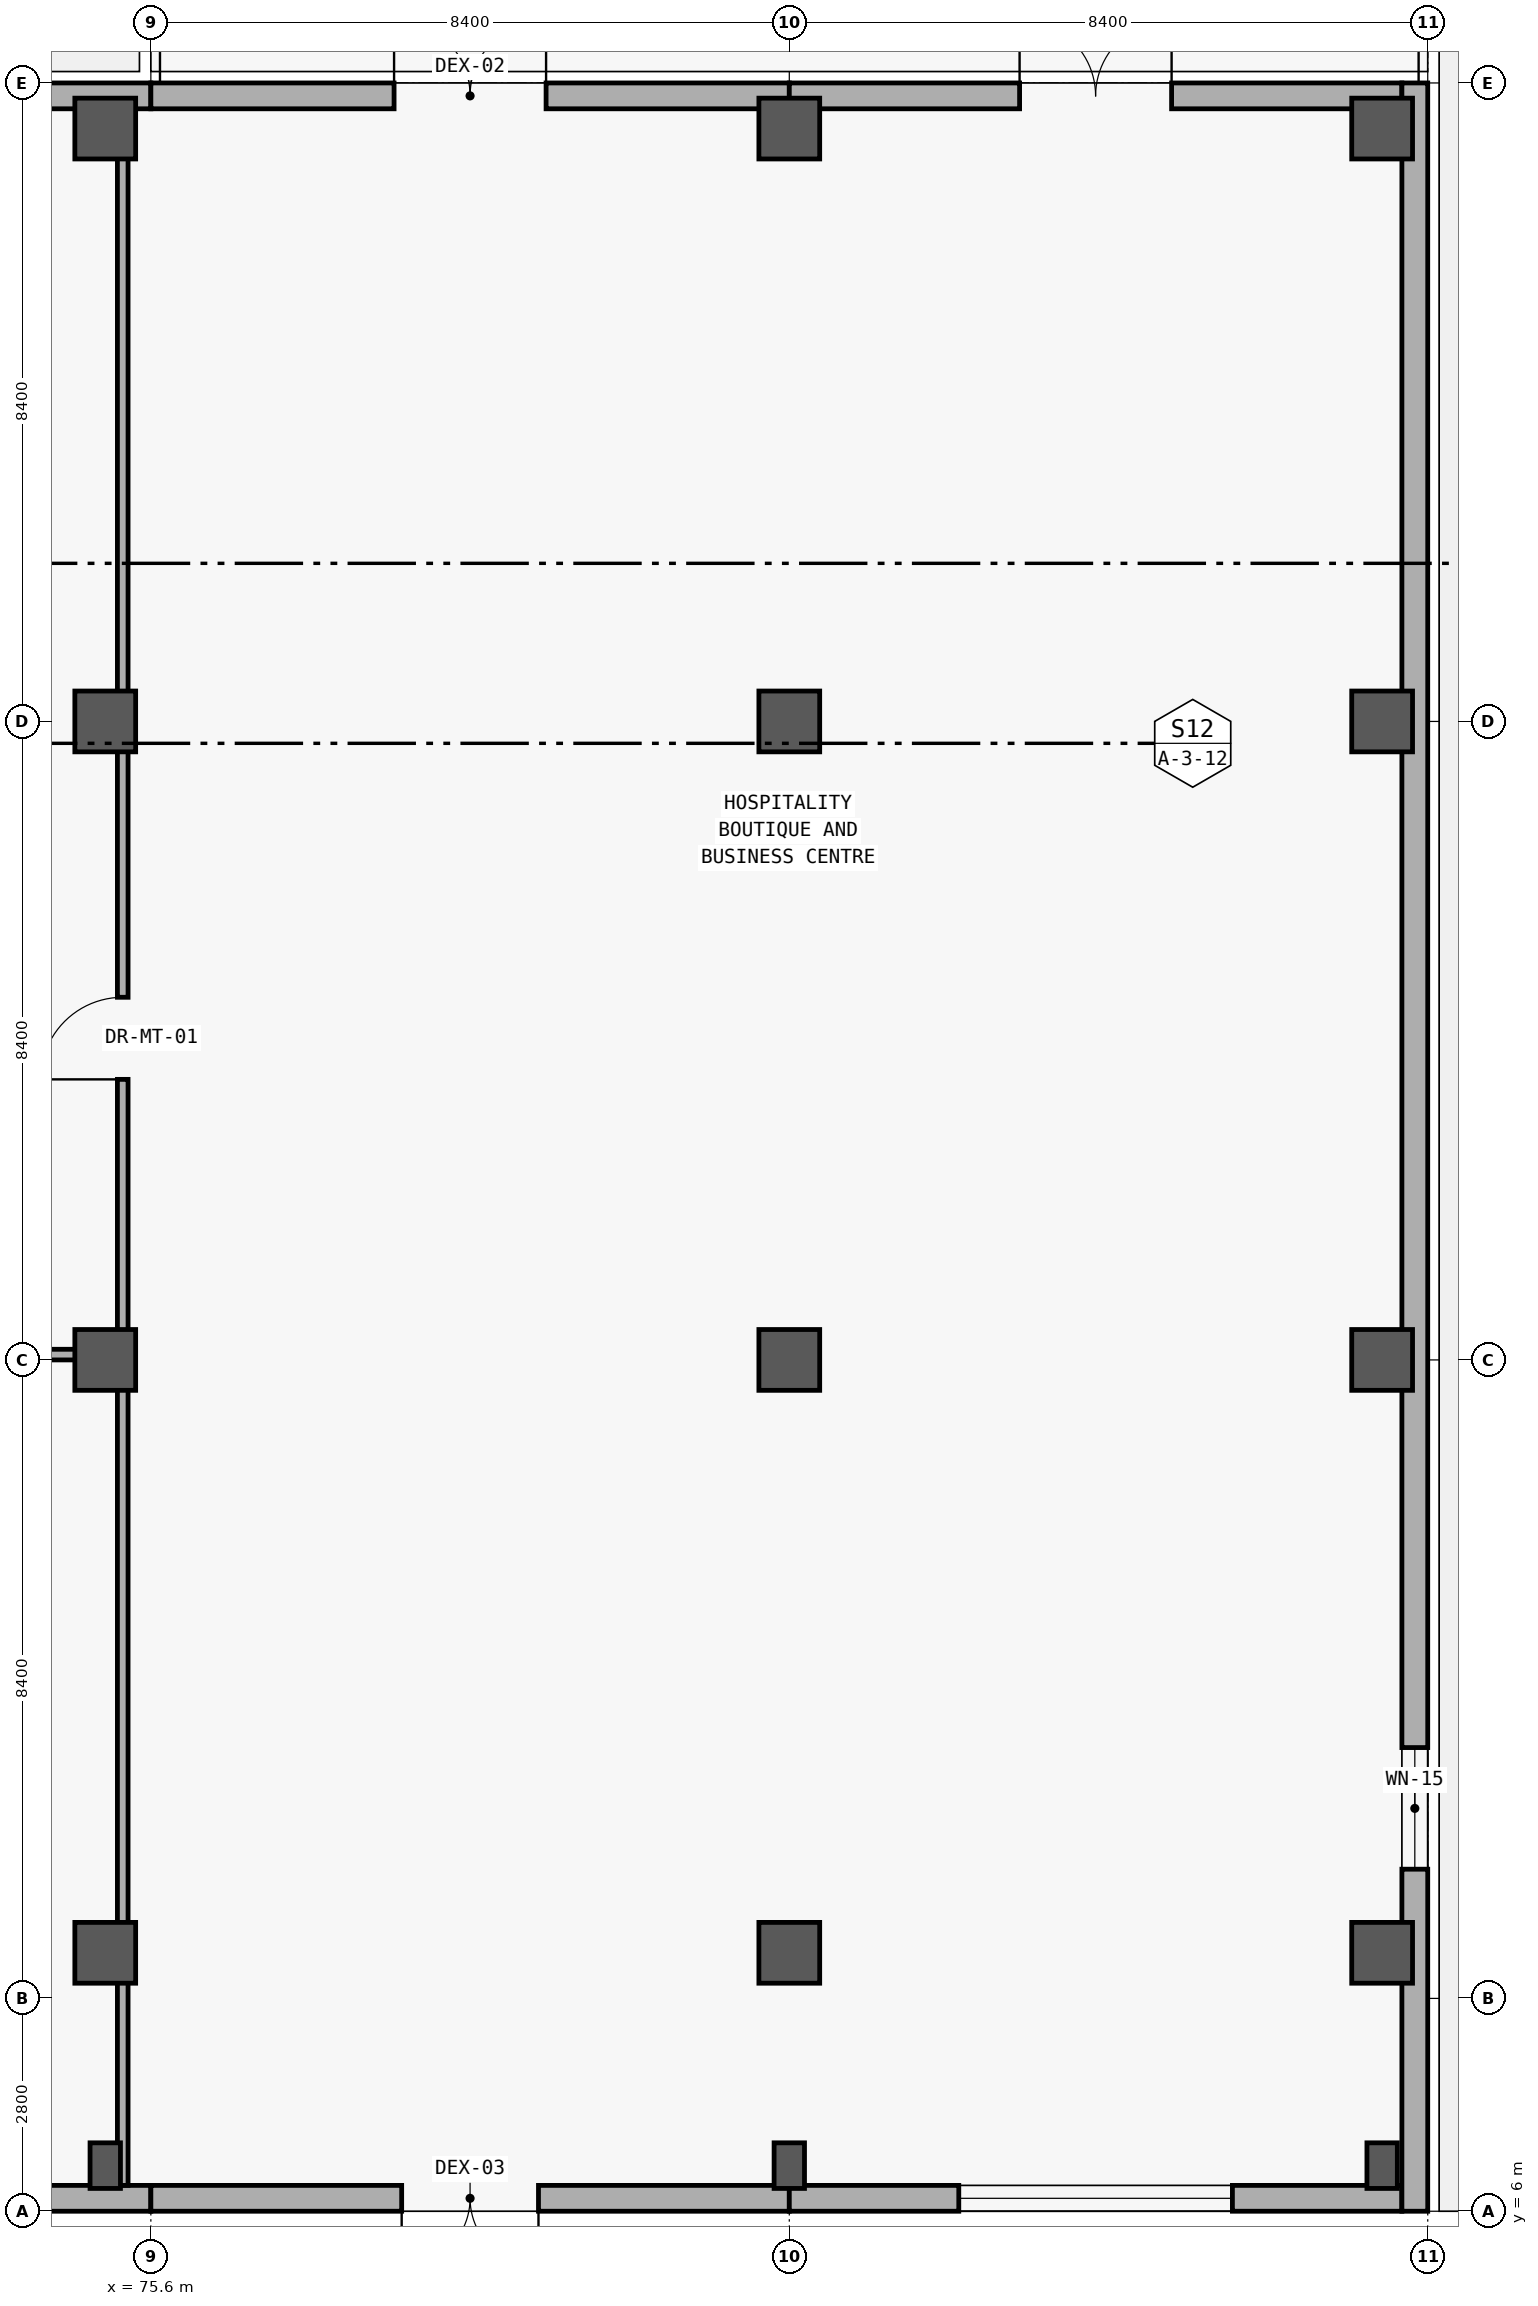
"""IFC4 building model, lengths in metres.
Left out: names, types, materials, properties, quantities, classifications, styles, units other than length and angle.
Written with IfcOpenShell. Run it as: python <this file> out.ifc"""

import sys

from ifc_helpers import new_model, si_unit, direction, frame, frame_2d, origin, origin_2d, place, context, subcontext, project, spatial, rectangle, extrude, element, fill, save


model = new_model("IFC4")
c1 = context("Model", 3, precision=1e-05, world=origin(), true_north=direction((0.0, 1.0)))
c2 = subcontext(c1, "Body", "Model", "MODEL_VIEW")
j1 = project(units=[si_unit("LENGTHUNIT", "METRE"), si_unit("PLANEANGLEUNIT", "RADIAN")], contexts=[c1])
p1 = place(None, origin())
s1 = spatial("IfcSite", under=j1, at=p1, CompositionType="ELEMENT")
p2 = place(p1, origin())
s2 = spatial("IfcBuilding", under=s1, at=p2, CompositionType="ELEMENT")
p3 = place(p2, origin())
s3 = spatial("IfcBuildingStorey", under=s2, at=p3, CompositionType="ELEMENT", Elevation=0.0)
p4 = place(p3, frame((75.0, 6.6, 0.0), z_axis=(0.0, 0.0, 1.0), x_axis=(1.0, 0.0, 0.0)))
e1 = element("IfcColumn", 1, at=p4, inside=s3, PredefinedType="PILASTER", context=c2, shape_type="SweptSolid", body=[
    extrude(rectangle(XDim=0.4, YDim=0.6, at=origin_2d()), origin(), (0.0, 0.0, 1.0), 5.4),
])
for number, where, z_axis, x_axis in (
    (2, (75.0, 9.4, 0.0), (0.0, 0.0, 1.0), (1.0, 0.0, 0.0)),
    (3, (75.0, 17.2, 0.0), (0.0, 0.0, 1.0), (1.0, 0.0, 0.0)),
    (4, (75.0, 25.6, 0.0), (0.0, 0.0, 1.0), (1.0, 0.0, 0.0)),
    (5, (75.0, 33.4, 0.0), (0.0, 0.0, 1.0), (1.0, 0.0, 0.0)),
):
    element("IfcColumn", number, at=place(p3, frame(where, z_axis=z_axis, x_axis=x_axis)), inside=s3, PredefinedType="COLUMN", context=c2, shape_type="SweptSolid", body=[
        extrude(rectangle(XDim=0.8, YDim=0.8, at=origin_2d()), origin(), (0.0, 0.0, 1.0), 5.4),
    ])
p5 = place(p3, frame((84.0, 6.6, 0.0), z_axis=(0.0, 0.0, 1.0), x_axis=(1.0, 0.0, 0.0)))
e6 = element("IfcColumn", 6, at=p5, inside=s3, PredefinedType="PILASTER", context=c2, shape_type="SweptSolid", body=[
    extrude(rectangle(XDim=0.4, YDim=0.6, at=origin_2d()), origin(), (0.0, 0.0, 1.0), 5.4),
])
for number, where, z_axis, x_axis in (
    (7, (84.0, 9.4, 0.0), (0.0, 0.0, 1.0), (1.0, 0.0, 0.0)),
    (8, (84.0, 17.2, 0.0), (0.0, 0.0, 1.0), (1.0, 0.0, 0.0)),
    (9, (84.0, 25.6, 0.0), (0.0, 0.0, 1.0), (1.0, 0.0, 0.0)),
    (10, (84.0, 33.4, 0.0), (0.0, 0.0, 1.0), (1.0, 0.0, 0.0)),
):
    element("IfcColumn", number, at=place(p3, frame(where, z_axis=z_axis, x_axis=x_axis)), inside=s3, PredefinedType="COLUMN", context=c2, shape_type="SweptSolid", body=[
        extrude(rectangle(XDim=0.8, YDim=0.8, at=origin_2d()), origin(), (0.0, 0.0, 1.0), 5.4),
    ])
p6 = place(p3, frame((91.8, 6.6, 0.0), z_axis=(0.0, 0.0, 1.0), x_axis=(1.0, 0.0, 0.0)))
e11 = element("IfcColumn", 11, at=p6, inside=s3, PredefinedType="PILASTER", context=c2, shape_type="SweptSolid", body=[
    extrude(rectangle(XDim=0.4, YDim=0.6, at=origin_2d()), origin(), (0.0, 0.0, 1.0), 5.4),
])
for number, where, z_axis, x_axis in (
    (12, (91.8, 9.4, 0.0), (0.0, 0.0, 1.0), (1.0, 0.0, 0.0)),
    (13, (91.8, 17.2, 0.0), (0.0, 0.0, 1.0), (1.0, 0.0, 0.0)),
    (14, (91.8, 25.6, 0.0), (0.0, 0.0, 1.0), (1.0, 0.0, 0.0)),
    (15, (91.8, 33.4, 0.0), (0.0, 0.0, 1.0), (1.0, 0.0, 0.0)),
):
    element("IfcColumn", number, at=place(p3, frame(where, z_axis=z_axis, x_axis=x_axis)), inside=s3, PredefinedType="COLUMN", context=c2, shape_type="SweptSolid", body=[
        extrude(rectangle(XDim=0.8, YDim=0.8, at=origin_2d()), origin(), (0.0, 0.0, 1.0), 5.4),
    ])
p7 = place(p3, frame((75.6, 6.17, 0.0), z_axis=(0.0, 0.0, 1.0), x_axis=(-1.0, 0.0, 0.0)))
e16 = element("IfcWall", 16, at=p7, inside=s3, PredefinedType="SOLIDWALL", context=c2, shape_type="SweptSolid", body=[
    extrude(rectangle(XDim=8.4, YDim=0.34, at=frame_2d((4.2, 0.0))), origin(), (0.0, 0.0, 1.0), 5.1),
])
p8 = place(p7, frame((2.4, 0.0, 0.9)))
e17 = element("IfcOpeningElement", 17, at=p8, cuts=e16, PredefinedType="OPENING", context=c2, shape_type="SweptSolid", body=[
    extrude(rectangle(XDim=3.6, YDim=2.3, at=frame_2d((1.8, 1.15))), frame((0.0, 0.18, 0.0), z_axis=(0.0, -1.0, 0.0), x_axis=(1.0, 0.0, 0.0)), (0.0, 0.0, 1.0), 0.36),
])
p9 = place(p3, frame((67.2, 33.83, 0.0), z_axis=(0.0, 0.0, 1.0), x_axis=(1.0, 0.0, 0.0)))
e18 = element("IfcWall", 18, at=p9, inside=s3, PredefinedType="SOLIDWALL", context=c2, shape_type="SweptSolid", body=[
    extrude(rectangle(XDim=8.4, YDim=0.34, at=frame_2d((4.2, 0.0))), origin(), (0.0, 0.0, 1.0), 5.1),
])
p10 = place(p9, frame((2.65, 0.0, 0.9)))
e19 = element("IfcOpeningElement", 19, at=p10, cuts=e18, PredefinedType="OPENING", context=c2, shape_type="SweptSolid", body=[
    extrude(rectangle(XDim=3.1, YDim=2.2, at=frame_2d((1.55, 1.1))), frame((0.0, 0.18, 0.0), z_axis=(0.0, -1.0, 0.0), x_axis=(1.0, 0.0, 0.0)), (0.0, 0.0, 1.0), 0.36),
])
p11 = place(p3, frame((84.0, 6.17, 0.0), z_axis=(0.0, 0.0, 1.0), x_axis=(-1.0, 0.0, 0.0)))
e20 = element("IfcWall", 20, at=p11, inside=s3, PredefinedType="SOLIDWALL", context=c2, shape_type="SweptSolid", body=[
    extrude(rectangle(XDim=8.4, YDim=0.34, at=frame_2d((4.2, 0.0))), origin(), (0.0, 0.0, 1.0), 5.1),
])
p12 = place(p11, frame((3.3, 0.0, 0.0)))
e21 = element("IfcOpeningElement", 21, at=p12, cuts=e20, PredefinedType="OPENING", context=c2, shape_type="SweptSolid", body=[
    extrude(rectangle(XDim=1.8, YDim=2.4, at=frame_2d((0.9, 1.2))), frame((0.0, 0.18, 0.0), z_axis=(0.0, -1.0, 0.0), x_axis=(1.0, 0.0, 0.0)), (0.0, 0.0, 1.0), 0.36),
])
p13 = place(p3, frame((75.6, 33.83, 0.0), z_axis=(0.0, 0.0, 1.0), x_axis=(1.0, 0.0, 0.0)))
e22 = element("IfcWall", 22, at=p13, inside=s3, PredefinedType="SOLIDWALL", context=c2, shape_type="SweptSolid", body=[
    extrude(rectangle(XDim=8.4, YDim=0.34, at=frame_2d((4.2, 0.0))), origin(), (0.0, 0.0, 1.0), 5.1),
])
p14 = place(p13, frame((3.2, 0.0, 0.0)))
e23 = element("IfcOpeningElement", 23, at=p14, cuts=e22, PredefinedType="OPENING", context=c2, shape_type="SweptSolid", body=[
    extrude(rectangle(XDim=2.0, YDim=2.6, at=frame_2d((1.0, 1.3))), frame((0.0, 0.18, 0.0), z_axis=(0.0, -1.0, 0.0), x_axis=(1.0, 0.0, 0.0)), (0.0, 0.0, 1.0), 0.36),
])
p15 = place(p3, frame((92.06, 6.17, 0.0), z_axis=(0.0, 0.0, 1.0), x_axis=(-1.0, 0.0, 0.0)))
e24 = element("IfcWall", 24, at=p15, inside=s3, PredefinedType="SOLIDWALL", context=c2, shape_type="SweptSolid", body=[
    extrude(rectangle(XDim=8.06, YDim=0.34, at=frame_2d((4.03, 0.0))), origin(), (0.0, 0.0, 1.0), 5.1),
])
p16 = place(p15, frame((2.23, 0.0, 0.9)))
e25 = element("IfcOpeningElement", 25, at=p16, cuts=e24, PredefinedType="OPENING", context=c2, shape_type="SweptSolid", body=[
    extrude(rectangle(XDim=3.6, YDim=2.3, at=frame_2d((1.8, 1.15))), frame((0.0, 0.18, 0.0), z_axis=(0.0, -1.0, 0.0), x_axis=(1.0, 0.0, 0.0)), (0.0, 0.0, 1.0), 0.36),
])
p17 = place(p3, frame((84.0, 33.83, 0.0), z_axis=(0.0, 0.0, 1.0), x_axis=(1.0, 0.0, 0.0)))
e26 = element("IfcWall", 26, at=p17, inside=s3, PredefinedType="SOLIDWALL", context=c2, shape_type="SweptSolid", body=[
    extrude(rectangle(XDim=8.06, YDim=0.34, at=frame_2d((4.03, 0.0))), origin(), (0.0, 0.0, 1.0), 5.1),
])
p18 = place(p17, frame((3.03, 0.0, 0.0)))
e27 = element("IfcOpeningElement", 27, at=p18, cuts=e26, PredefinedType="OPENING", context=c2, shape_type="SweptSolid", body=[
    extrude(rectangle(XDim=2.0, YDim=2.6, at=frame_2d((1.0, 1.3))), frame((0.0, 0.18, 0.0), z_axis=(0.0, -1.0, 0.0), x_axis=(1.0, 0.0, 0.0)), (0.0, 0.0, 1.0), 0.36),
])
p19 = place(p3, frame((92.23, 34.0, 0.0), z_axis=(0.0, 0.0, 1.0), x_axis=(0.0, -1.0, 0.0)))
e28 = element("IfcWall", 28, at=p19, inside=s3, PredefinedType="SOLIDWALL", context=c2, shape_type="SweptSolid", body=[
    extrude(rectangle(XDim=28.0, YDim=0.34, at=frame_2d((14.0, 0.0))), origin(), (0.0, 0.0, 1.0), 5.1),
])
p20 = place(p19, frame((21.9, 0.0, 0.95)))
e29 = element("IfcOpeningElement", 29, at=p20, cuts=e28, PredefinedType="OPENING", context=c2, shape_type="SweptSolid", body=[
    extrude(rectangle(XDim=1.6, YDim=1.6, at=frame_2d((0.8, 0.8))), frame((0.0, 0.18, 0.0), z_axis=(0.0, -1.0, 0.0), x_axis=(1.0, 0.0, 0.0)), (0.0, 0.0, 1.0), 0.36),
])
p21 = place(p3, frame((59.12, 17.27, 0.0), z_axis=(0.0, 0.0, 1.0), x_axis=(1.0, 0.0, 0.0)))
e30 = element("IfcWall", 30, at=p21, inside=s3, PredefinedType="PARTITIONING", context=c2, shape_type="SweptSolid", body=[
    extrude(rectangle(XDim=16.06, YDim=0.14, at=frame_2d((8.03, 0.0))), origin(), (0.0, 0.0, 1.0), 4.18),
])
p22 = place(p21, frame((11.2, 0.0, 0.0)))
e31 = element("IfcOpeningElement", 31, at=p22, cuts=e30, PredefinedType="OPENING", context=c2, shape_type="SweptSolid", body=[
    extrude(rectangle(XDim=1.08, YDim=2.25, at=frame_2d((0.54, 1.125))), frame((0.0, 0.08, 0.0), z_axis=(0.0, -1.0, 0.0), x_axis=(1.0, 0.0, 0.0)), (0.0, 0.0, 1.0), 0.16),
])
p23 = place(p3, frame((75.23, 6.34, 0.0), z_axis=(0.0, 0.0, 1.0), x_axis=(0.0, 1.0, 0.0)))
e32 = element("IfcWall", 32, at=p23, inside=s3, PredefinedType="PARTITIONING", context=c2, shape_type="SweptSolid", body=[
    extrude(rectangle(XDim=27.32, YDim=0.14, at=frame_2d((13.66, 0.0))), origin(), (0.0, 0.0, 1.0), 4.18),
])
p24 = place(p23, frame((14.551, 0.0, 0.0)))
e33 = element("IfcOpeningElement", 33, at=p24, cuts=e32, PredefinedType="OPENING", context=c2, shape_type="SweptSolid", body=[
    extrude(rectangle(XDim=1.08, YDim=2.25, at=frame_2d((0.54, 1.125))), frame((0.0, 0.08, 0.0), z_axis=(0.0, -1.0, 0.0), x_axis=(1.0, 0.0, 0.0)), (0.0, 0.0, 1.0), 0.16),
])
p25 = place(p12, origin())
e34 = element("IfcDoor", 34, at=p25, inside=s3, OperationType="DOUBLE_DOOR_SINGLE_SWING", PredefinedType="DOOR", context=c2, shape_type="SweptSolid", body=[
    extrude(rectangle(XDim=1.8, YDim=2.4, at=frame_2d((0.9, 1.2))), frame((0.0, 0.025, 0.0), z_axis=(0.0, -1.0, 0.0), x_axis=(1.0, 0.0, 0.0)), (0.0, 0.0, 1.0), 0.05),
])
fill(e21, e34)
p26 = place(p14, origin())
e35 = element("IfcDoor", 35, at=p26, inside=s3, OperationType="DOUBLE_DOOR_SINGLE_SWING", PredefinedType="DOOR", context=c2, shape_type="SweptSolid", body=[
    extrude(rectangle(XDim=2.0, YDim=2.6, at=frame_2d((1.0, 1.3))), frame((0.0, 0.025, 0.0), z_axis=(0.0, -1.0, 0.0), x_axis=(1.0, 0.0, 0.0)), (0.0, 0.0, 1.0), 0.05),
])
fill(e23, e35)
p27 = place(p16, origin())
e36 = element("IfcWindow", 36, at=p27, inside=s3, PartitioningType="SINGLE_PANEL", PredefinedType="WINDOW", context=c2, shape_type="SweptSolid", body=[
    extrude(rectangle(XDim=3.6, YDim=2.3, at=frame_2d((1.8, 1.15))), frame((0.0, 0.03, 0.0), z_axis=(0.0, -1.0, 0.0), x_axis=(1.0, 0.0, 0.0)), (0.0, 0.0, 1.0), 0.06),
])
fill(e25, e36)
p28 = place(p18, origin())
e37 = element("IfcDoor", 37, at=p28, inside=s3, OperationType="DOUBLE_DOOR_SINGLE_SWING", PredefinedType="DOOR", context=c2, shape_type="SweptSolid", body=[
    extrude(rectangle(XDim=2.0, YDim=2.6, at=frame_2d((1.0, 1.3))), frame((0.0, 0.025, 0.0), z_axis=(0.0, -1.0, 0.0), x_axis=(1.0, 0.0, 0.0)), (0.0, 0.0, 1.0), 0.05),
])
fill(e27, e37)
p29 = place(p20, origin())
e38 = element("IfcWindow", 38, at=p29, inside=s3, PartitioningType="SINGLE_PANEL", PredefinedType="WINDOW", context=c2, shape_type="SweptSolid", body=[
    extrude(rectangle(XDim=1.6, YDim=1.6, at=frame_2d((0.8, 0.8))), frame((0.0, 0.03, 0.0), z_axis=(0.0, -1.0, 0.0), x_axis=(1.0, 0.0, 0.0)), (0.0, 0.0, 1.0), 0.06),
])
fill(e29, e38)
p30 = place(p24, origin())
e39 = element("IfcDoor", 39, at=p30, inside=s3, OperationType="SINGLE_SWING_LEFT", PredefinedType="DOOR", context=c2, shape_type="SweptSolid", body=[
    extrude(rectangle(XDim=1.08, YDim=2.25, at=frame_2d((0.54, 1.125))), frame((0.0, 0.025, 0.0), z_axis=(0.0, -1.0, 0.0), x_axis=(1.0, 0.0, 0.0)), (0.0, 0.0, 1.0), 0.05),
])
fill(e33, e39)
save(model, sys.argv[1])
